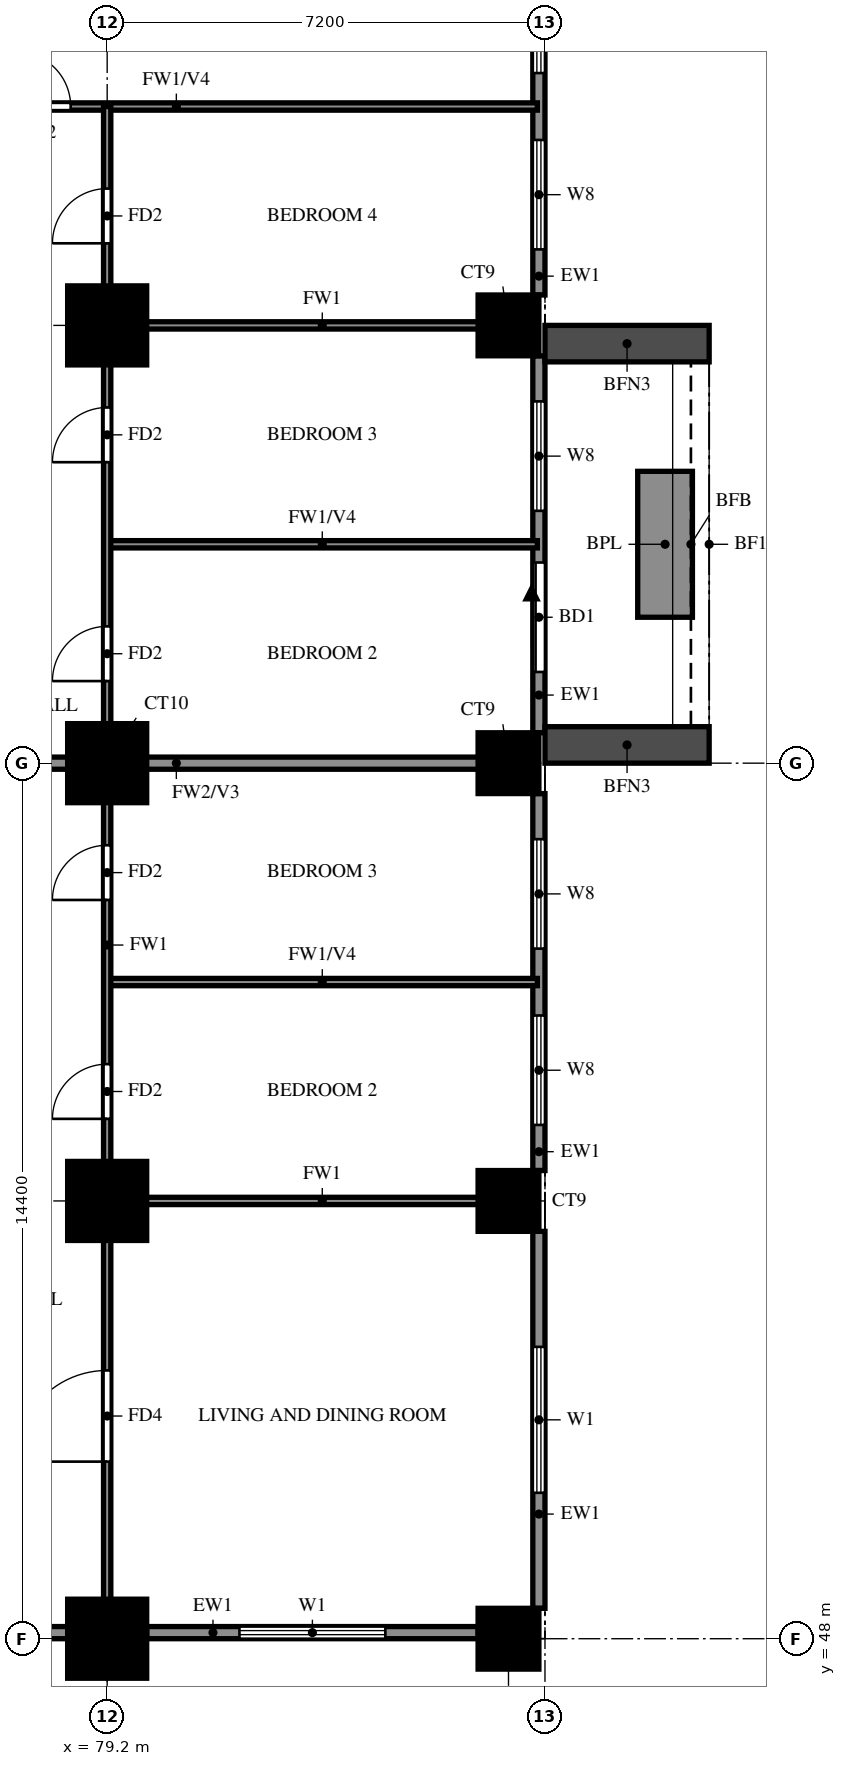
"""IFC4 building model, lengths in metres.
Left out: names, types, materials, properties, quantities, classifications, styles, units other than length and angle.
Written with IfcOpenShell. Run it as: python <this file> out.ifc"""

import sys

from ifc_helpers import new_model, si_unit, direction, frame, frame_2d, origin, origin_2d, place, context, subcontext, project, spatial, rectangle, extrude, source, transform, mapped, element, fill, save


model = new_model("IFC4")
c1 = context("Model", 3, precision=1e-05, world=origin(), true_north=direction((0.0, 1.0)))
c2 = subcontext(c1, "Body", "Model", "MODEL_VIEW")
j1 = project(units=[si_unit("LENGTHUNIT", "METRE"), si_unit("PLANEANGLEUNIT", "RADIAN")], contexts=[c1])
p1 = place(None, origin())
s1 = spatial("IfcSite", under=j1, at=p1, CompositionType="ELEMENT")
p2 = place(p1, origin())
s2 = spatial("IfcBuilding", under=s1, at=p2, CompositionType="ELEMENT")
p3 = place(p2, frame((0.0, 0.0, 76.0)))
s3 = spatial("IfcBuildingStorey", under=s2, at=p3, CompositionType="ELEMENT", Elevation=76.0)
m1 = source(origin(), c2, "Body", "SweptSolid", [
    extrude(rectangle(XDim=1.3, YDim=1.3, at=origin_2d()), origin(), (0.0, 0.0, 1.0), 3.18),
])
p4 = place(p3, frame((79.2, 48.0, 0.0), z_axis=(0.0, 0.0, 1.0), x_axis=(1.0, 0.0, 0.0)))
e1 = element("IfcColumn", 1, at=p4, inside=s3, PredefinedType="COLUMN", context=c2, shape_type="MappedRepresentation", body=[
    mapped(m1, transform((0.0, 0.0, 0.0))),
])
m2 = source(origin(), c2, "Body", "SweptSolid", [
    extrude(rectangle(XDim=1.0, YDim=1.0, at=origin_2d()), origin(), (0.0, 0.0, 1.0), 3.18),
])
p5 = place(p3, frame((85.8, 48.0, 0.0), z_axis=(0.0, 0.0, 1.0), x_axis=(1.0, 0.0, 0.0)))
e2 = element("IfcColumn", 2, at=p5, inside=s3, PredefinedType="COLUMN", context=c2, shape_type="MappedRepresentation", body=[
    mapped(m2, transform((0.0, 0.0, 0.0))),
])
p6 = place(p3, frame((79.2, 55.2, 0.0), z_axis=(0.0, 0.0, 1.0), x_axis=(1.0, 0.0, 0.0)))
e3 = element("IfcColumn", 3, at=p6, inside=s3, PredefinedType="COLUMN", context=c2, shape_type="MappedRepresentation", body=[
    mapped(m1, transform((0.0, 0.0, 0.0))),
])
p7 = place(p3, frame((85.8, 55.2, 0.0), z_axis=(0.0, 0.0, 1.0), x_axis=(1.0, 0.0, 0.0)))
e4 = element("IfcColumn", 4, at=p7, inside=s3, PredefinedType="COLUMN", context=c2, shape_type="MappedRepresentation", body=[
    mapped(m2, transform((0.0, 0.0, 0.0))),
])
p8 = place(p3, frame((79.2, 62.4, 0.0), z_axis=(0.0, 0.0, 1.0), x_axis=(1.0, 0.0, 0.0)))
e5 = element("IfcColumn", 5, at=p8, inside=s3, PredefinedType="COLUMN", context=c2, shape_type="MappedRepresentation", body=[
    mapped(m1, transform((0.0, 0.0, 0.0))),
])
p9 = place(p3, frame((85.8, 62.4, 0.0), z_axis=(0.0, 0.0, 1.0), x_axis=(1.0, 0.0, 0.0)))
e6 = element("IfcColumn", 6, at=p9, inside=s3, PredefinedType="COLUMN", context=c2, shape_type="MappedRepresentation", body=[
    mapped(m2, transform((0.0, 0.0, 0.0))),
])
p10 = place(p3, frame((79.2, 69.6, 0.0), z_axis=(0.0, 0.0, 1.0), x_axis=(1.0, 0.0, 0.0)))
e7 = element("IfcColumn", 7, at=p10, inside=s3, PredefinedType="COLUMN", context=c2, shape_type="MappedRepresentation", body=[
    mapped(m1, transform((0.0, 0.0, 0.0))),
])
p11 = place(p3, frame((85.8, 69.6, 0.0), z_axis=(0.0, 0.0, 1.0), x_axis=(1.0, 0.0, 0.0)))
e8 = element("IfcColumn", 8, at=p11, inside=s3, PredefinedType="COLUMN", context=c2, shape_type="MappedRepresentation", body=[
    mapped(m2, transform((0.0, 0.0, 0.0))),
])
p12 = place(p3, frame((85.996, 33.863, 0.0), z_axis=(0.0, 0.0, 1.0), x_axis=(-0.707100718496, 0.707112843825, 0.0)))
e9 = element("IfcWall", 9, at=p12, inside=s3, PredefinedType="SOLIDWALL", context=c2, shape_type="SweptSolid", body=[
    extrude(rectangle(XDim=20.135, YDim=0.2, at=frame_2d((10.067, 0.0))), origin(), (0.0, 0.0, 1.0), 3.18),
])
p13 = place(p3, frame((71.989, 48.1, 0.0), z_axis=(0.0, 0.0, 1.0), x_axis=(1.0, 0.0, 0.0)))
e10 = element("IfcWall", 10, at=p13, inside=s3, PredefinedType="SOLIDWALL", context=c2, shape_type="SweptSolid", body=[
    extrude(rectangle(XDim=6.562, YDim=0.2, at=frame_2d((3.281, 0.0))), origin(), (0.0, 0.0, 1.0), 3.18),
])
p14 = place(p13, frame((2.206, 0.0, 1.5)))
e11 = element("IfcOpeningElement", 11, at=p14, cuts=e10, PredefinedType="OPENING", context=c2, shape_type="SweptSolid", body=[
    extrude(rectangle(XDim=0.9, YDim=0.9, at=frame_2d((0.45, 0.45))), frame((0.0, 0.11, 0.0), z_axis=(0.0, -1.0, 0.0), x_axis=(1.0, 0.0, 0.0)), (0.0, 0.0, 1.0), 0.22),
])
p15 = place(p3, frame((79.85, 48.1, 0.0), z_axis=(0.0, 0.0, 1.0), x_axis=(1.0, 0.0, 0.0)))
e12 = element("IfcWall", 12, at=p15, inside=s3, PredefinedType="SOLIDWALL", context=c2, shape_type="SweptSolid", body=[
    extrude(rectangle(XDim=5.45, YDim=0.2, at=frame_2d((2.725, 0.0))), origin(), (0.0, 0.0, 1.0), 3.18),
])
p16 = place(p15, frame((1.525, 0.0, 0.6)))
e13 = element("IfcOpeningElement", 13, at=p16, cuts=e12, PredefinedType="OPENING", context=c2, shape_type="SweptSolid", body=[
    extrude(rectangle(XDim=2.4, YDim=2.4, at=frame_2d((1.2, 1.2))), frame((0.0, 0.11, 0.0), z_axis=(0.0, -1.0, 0.0), x_axis=(1.0, 0.0, 0.0)), (0.0, 0.0, 1.0), 0.22),
])
p17 = place(p3, frame((86.3, 48.5, 0.0), z_axis=(0.0, 0.0, 1.0), x_axis=(0.0, 1.0, 0.0)))
e14 = element("IfcWall", 14, at=p17, inside=s3, PredefinedType="SOLIDWALL", context=c2, shape_type="SweptSolid", body=[
    extrude(rectangle(XDim=6.2, YDim=0.2, at=frame_2d((3.1, 0.0))), origin(), (0.0, 0.0, 1.0), 3.18),
])
p18 = place(p17, frame((1.9, 0.0, 0.6)))
e15 = element("IfcOpeningElement", 15, at=p18, cuts=e14, PredefinedType="OPENING", context=c2, shape_type="SweptSolid", body=[
    extrude(rectangle(XDim=2.4, YDim=2.4, at=frame_2d((1.2, 1.2))), frame((0.0, 0.11, 0.0), z_axis=(0.0, -1.0, 0.0), x_axis=(1.0, 0.0, 0.0)), (0.0, 0.0, 1.0), 0.22),
])
p19 = place(p3, frame((86.3, 55.7, 0.0), z_axis=(0.0, 0.0, 1.0), x_axis=(0.0, 1.0, 0.0)))
e16 = element("IfcWall", 16, at=p19, inside=s3, PredefinedType="SOLIDWALL", context=c2, shape_type="SweptSolid", body=[
    extrude(rectangle(XDim=6.2, YDim=0.2, at=frame_2d((3.1, 0.0))), origin(), (0.0, 0.0, 1.0), 3.18),
])
p20 = place(p19, frame((0.75, 0.0, 0.6)))
e17 = element("IfcOpeningElement", 17, at=p20, cuts=e16, PredefinedType="OPENING", context=c2, shape_type="SweptSolid", body=[
    extrude(rectangle(XDim=1.8, YDim=2.4, at=frame_2d((0.9, 1.2))), frame((0.0, 0.11, 0.0), z_axis=(0.0, -1.0, 0.0), x_axis=(1.0, 0.0, 0.0)), (0.0, 0.0, 1.0), 0.22),
])
p21 = place(p19, frame((3.65, 0.0, 0.6)))
e18 = element("IfcOpeningElement", 18, at=p21, cuts=e16, PredefinedType="OPENING", context=c2, shape_type="SweptSolid", body=[
    extrude(rectangle(XDim=1.8, YDim=2.4, at=frame_2d((0.9, 1.2))), frame((0.0, 0.11, 0.0), z_axis=(0.0, -1.0, 0.0), x_axis=(1.0, 0.0, 0.0)), (0.0, 0.0, 1.0), 0.22),
])
p22 = place(p3, frame((86.3, 62.9, 0.0), z_axis=(0.0, 0.0, 1.0), x_axis=(0.0, 1.0, 0.0)))
e19 = element("IfcWall", 19, at=p22, inside=s3, PredefinedType="SOLIDWALL", context=c2, shape_type="SweptSolid", body=[
    extrude(rectangle(XDim=6.2, YDim=0.2, at=frame_2d((3.1, 0.0))), origin(), (0.0, 0.0, 1.0), 3.18),
])
p23 = place(p22, frame((1.0, 0.0, 0.0)))
e20 = element("IfcOpeningElement", 20, at=p23, cuts=e19, PredefinedType="OPENING", context=c2, shape_type="SweptSolid", body=[
    extrude(rectangle(XDim=1.8, YDim=2.4, at=frame_2d((0.9, 1.2))), frame((0.0, 0.11, 0.0), z_axis=(0.0, -1.0, 0.0), x_axis=(1.0, 0.0, 0.0)), (0.0, 0.0, 1.0), 0.22),
])
p24 = place(p22, frame((3.65, 0.0, 0.6)))
e21 = element("IfcOpeningElement", 21, at=p24, cuts=e19, PredefinedType="OPENING", context=c2, shape_type="SweptSolid", body=[
    extrude(rectangle(XDim=1.8, YDim=2.4, at=frame_2d((0.9, 1.2))), frame((0.0, 0.11, 0.0), z_axis=(0.0, -1.0, 0.0), x_axis=(1.0, 0.0, 0.0)), (0.0, 0.0, 1.0), 0.22),
])
p25 = place(p3, frame((86.3, 70.1, 0.0), z_axis=(0.0, 0.0, 1.0), x_axis=(0.0, 1.0, 0.0)))
e22 = element("IfcWall", 22, at=p25, inside=s3, PredefinedType="SOLIDWALL", context=c2, shape_type="SweptSolid", body=[
    extrude(rectangle(XDim=6.2, YDim=0.2, at=frame_2d((3.1, 0.0))), origin(), (0.0, 0.0, 1.0), 3.18),
])
p26 = place(p25, frame((0.75, 0.0, 0.6)))
e23 = element("IfcOpeningElement", 23, at=p26, cuts=e22, PredefinedType="OPENING", context=c2, shape_type="SweptSolid", body=[
    extrude(rectangle(XDim=1.8, YDim=2.4, at=frame_2d((0.9, 1.2))), frame((0.0, 0.11, 0.0), z_axis=(0.0, -1.0, 0.0), x_axis=(1.0, 0.0, 0.0)), (0.0, 0.0, 1.0), 0.22),
])
p27 = place(p25, frame((3.65, 0.0, 0.6)))
e24 = element("IfcOpeningElement", 24, at=p27, cuts=e22, PredefinedType="OPENING", context=c2, shape_type="SweptSolid", body=[
    extrude(rectangle(XDim=1.8, YDim=2.4, at=frame_2d((0.9, 1.2))), frame((0.0, 0.11, 0.0), z_axis=(0.0, -1.0, 0.0), x_axis=(1.0, 0.0, 0.0)), (0.0, 0.0, 1.0), 0.22),
])
for number, where, z_axis, x_axis in (
    (25, (86.4, 62.7, 0.0), (0.0, 0.0, 1.0), (1.0, 0.0, 0.0)),
    (26, (86.4, 69.3, 0.0), (0.0, 0.0, 1.0), (1.0, 0.0, 0.0)),
):
    element("IfcWall", number, at=place(p3, frame(where, z_axis=z_axis, x_axis=x_axis)), inside=s3, PredefinedType="SOLIDWALL", context=c2, shape_type="SweptSolid", body=[
        extrude(rectangle(XDim=2.7, YDim=0.6, at=frame_2d((1.35, 0.0))), origin(), (0.0, 0.0, 1.0), 2.85),
    ])
p28 = place(p3, frame((88.375, 64.8, 0.0), z_axis=(0.0, 0.0, 1.0), x_axis=(0.0, 1.0, 0.0)))
e27 = element("IfcWall", 27, at=p28, inside=s3, PredefinedType="SOLIDWALL", context=c2, shape_type="SweptSolid", body=[
    extrude(rectangle(XDim=2.4, YDim=0.9, at=frame_2d((1.2, 0.0))), origin(), (0.0, 0.0, 1.0), 0.9),
])
p29 = place(p3, frame((74.4, 62.4, 0.0), z_axis=(0.0, 0.0, 1.0), x_axis=(1.0, 0.0, 0.0)))
e28 = element("IfcWall", 28, at=p29, inside=s3, PredefinedType="SOLIDWALL", context=c2, shape_type="SweptSolid", body=[
    extrude(rectangle(XDim=11.875, YDim=0.2, at=frame_2d((5.938, 0.0))), origin(), (0.0, 0.0, 1.0), 3.18),
])
p30 = place(p3, frame((79.2, 55.2, 0.0), z_axis=(0.0, 0.0, 1.0), x_axis=(1.0, 0.0, 0.0)))
e29 = element("IfcWall", 29, at=p30, inside=s3, PredefinedType="PARTITIONING", context=c2, shape_type="SweptSolid", body=[
    extrude(rectangle(XDim=7.075, YDim=0.12, at=frame_2d((3.538, 0.0))), origin(), (0.0, 0.0, 1.0), 3.18),
])
for number, where, z_axis, x_axis in (
    (30, (79.2, 58.8, 0.0), (0.0, 0.0, 1.0), (1.0, 0.0, 0.0)),
    (31, (79.2, 66.0, 0.0), (0.0, 0.0, 1.0), (1.0, 0.0, 0.0)),
):
    element("IfcWall", number, at=place(p3, frame(where, z_axis=z_axis, x_axis=x_axis)), inside=s3, PredefinedType="PARTITIONING", context=c2, shape_type="SweptSolid", body=[
        extrude(rectangle(XDim=7.075, YDim=0.12, at=frame_2d((3.538, 0.0))), origin(), (0.0, 0.0, 1.0), 2.28),
    ])
p31 = place(p3, frame((79.2, 69.6, 0.0), z_axis=(0.0, 0.0, 1.0), x_axis=(1.0, 0.0, 0.0)))
e32 = element("IfcWall", 32, at=p31, inside=s3, PredefinedType="PARTITIONING", context=c2, shape_type="SweptSolid", body=[
    extrude(rectangle(XDim=7.075, YDim=0.12, at=frame_2d((3.538, 0.0))), origin(), (0.0, 0.0, 1.0), 3.18),
])
p32 = place(p3, frame((74.4, 73.2, 0.0), z_axis=(0.0, 0.0, 1.0), x_axis=(1.0, 0.0, 0.0)))
e33 = element("IfcWall", 33, at=p32, inside=s3, PredefinedType="PARTITIONING", context=c2, shape_type="SweptSolid", body=[
    extrude(rectangle(XDim=11.875, YDim=0.12, at=frame_2d((5.938, 0.0))), origin(), (0.0, 0.0, 1.0), 2.28),
])
p33 = place(p32, frame((3.3, 0.0, 0.0)))
e34 = element("IfcOpeningElement", 34, at=p33, cuts=e33, PredefinedType="OPENING", context=c2, shape_type="SweptSolid", body=[
    extrude(rectangle(XDim=0.9, YDim=2.1, at=frame_2d((0.45, 1.05))), frame((0.0, 0.07, 0.0), z_axis=(0.0, -1.0, 0.0), x_axis=(1.0, 0.0, 0.0)), (0.0, 0.0, 1.0), 0.14),
])
p34 = place(p3, frame((79.2, 48.125, 0.0), z_axis=(0.0, 0.0, 1.0), x_axis=(0.0, 1.0, 0.0)))
e35 = element("IfcWall", 35, at=p34, inside=s3, PredefinedType="PARTITIONING", context=c2, shape_type="SweptSolid", body=[
    extrude(rectangle(XDim=25.075, YDim=0.12, at=frame_2d((12.538, 0.0))), origin(), (0.0, 0.0, 1.0), 3.18),
])
p35 = place(p34, frame((2.788, 0.0, 0.0)))
e36 = element("IfcOpeningElement", 36, at=p35, cuts=e35, PredefinedType="OPENING", context=c2, shape_type="SweptSolid", body=[
    extrude(rectangle(XDim=1.5, YDim=2.1, at=frame_2d((0.75, 1.05))), frame((0.0, 0.07, 0.0), z_axis=(0.0, -1.0, 0.0), x_axis=(1.0, 0.0, 0.0)), (0.0, 0.0, 1.0), 0.14),
])
p36 = place(p34, frame((8.425, 0.0, 0.0)))
e37 = element("IfcOpeningElement", 37, at=p36, cuts=e35, PredefinedType="OPENING", context=c2, shape_type="SweptSolid", body=[
    extrude(rectangle(XDim=0.9, YDim=2.1, at=frame_2d((0.45, 1.05))), frame((0.0, 0.07, 0.0), z_axis=(0.0, -1.0, 0.0), x_axis=(1.0, 0.0, 0.0)), (0.0, 0.0, 1.0), 0.14),
])
p37 = place(p34, frame((12.025, 0.0, 0.0)))
e38 = element("IfcOpeningElement", 38, at=p37, cuts=e35, PredefinedType="OPENING", context=c2, shape_type="SweptSolid", body=[
    extrude(rectangle(XDim=0.9, YDim=2.1, at=frame_2d((0.45, 1.05))), frame((0.0, 0.07, 0.0), z_axis=(0.0, -1.0, 0.0), x_axis=(1.0, 0.0, 0.0)), (0.0, 0.0, 1.0), 0.14),
])
p38 = place(p34, frame((15.625, 0.0, 0.0)))
e39 = element("IfcOpeningElement", 39, at=p38, cuts=e35, PredefinedType="OPENING", context=c2, shape_type="SweptSolid", body=[
    extrude(rectangle(XDim=0.9, YDim=2.1, at=frame_2d((0.45, 1.05))), frame((0.0, 0.07, 0.0), z_axis=(0.0, -1.0, 0.0), x_axis=(1.0, 0.0, 0.0)), (0.0, 0.0, 1.0), 0.14),
])
p39 = place(p34, frame((19.225, 0.0, 0.0)))
e40 = element("IfcOpeningElement", 40, at=p39, cuts=e35, PredefinedType="OPENING", context=c2, shape_type="SweptSolid", body=[
    extrude(rectangle(XDim=0.9, YDim=2.1, at=frame_2d((0.45, 1.05))), frame((0.0, 0.07, 0.0), z_axis=(0.0, -1.0, 0.0), x_axis=(1.0, 0.0, 0.0)), (0.0, 0.0, 1.0), 0.14),
])
p40 = place(p34, frame((22.825, 0.0, 0.0)))
e41 = element("IfcOpeningElement", 41, at=p40, cuts=e35, PredefinedType="OPENING", context=c2, shape_type="SweptSolid", body=[
    extrude(rectangle(XDim=0.9, YDim=2.1, at=frame_2d((0.45, 1.05))), frame((0.0, 0.07, 0.0), z_axis=(0.0, -1.0, 0.0), x_axis=(1.0, 0.0, 0.0)), (0.0, 0.0, 1.0), 0.14),
])
p41 = place(p16, origin())
e42 = element("IfcWindow", 42, at=p41, inside=s3, PartitioningType="DOUBLE_PANEL_VERTICAL", PredefinedType="WINDOW", context=c2, shape_type="SweptSolid", body=[
    extrude(rectangle(XDim=2.4, YDim=2.4, at=frame_2d((1.2, 1.2))), frame((0.0, 0.03, 0.0), z_axis=(0.0, -1.0, 0.0), x_axis=(1.0, 0.0, 0.0)), (0.0, 0.0, 1.0), 0.06),
])
fill(e13, e42)
p42 = place(p18, origin())
e43 = element("IfcWindow", 43, at=p42, inside=s3, PartitioningType="DOUBLE_PANEL_VERTICAL", PredefinedType="WINDOW", context=c2, shape_type="SweptSolid", body=[
    extrude(rectangle(XDim=2.4, YDim=2.4, at=frame_2d((1.2, 1.2))), frame((0.0, 0.03, 0.0), z_axis=(0.0, -1.0, 0.0), x_axis=(1.0, 0.0, 0.0)), (0.0, 0.0, 1.0), 0.06),
])
fill(e15, e43)
p43 = place(p20, origin())
e44 = element("IfcWindow", 44, at=p43, inside=s3, PartitioningType="DOUBLE_PANEL_VERTICAL", PredefinedType="WINDOW", context=c2, shape_type="SweptSolid", body=[
    extrude(rectangle(XDim=1.8, YDim=2.4, at=frame_2d((0.9, 1.2))), frame((0.0, 0.03, 0.0), z_axis=(0.0, -1.0, 0.0), x_axis=(1.0, 0.0, 0.0)), (0.0, 0.0, 1.0), 0.06),
])
fill(e17, e44)
p44 = place(p21, origin())
e45 = element("IfcWindow", 45, at=p44, inside=s3, PartitioningType="DOUBLE_PANEL_VERTICAL", PredefinedType="WINDOW", context=c2, shape_type="SweptSolid", body=[
    extrude(rectangle(XDim=1.8, YDim=2.4, at=frame_2d((0.9, 1.2))), frame((0.0, 0.03, 0.0), z_axis=(0.0, -1.0, 0.0), x_axis=(1.0, 0.0, 0.0)), (0.0, 0.0, 1.0), 0.06),
])
fill(e18, e45)
p45 = place(p23, origin())
e46 = element("IfcDoor", 46, at=p45, inside=s3, OperationType="DOUBLE_DOOR_SLIDING", PredefinedType="DOOR", context=c2, shape_type="SweptSolid", body=[
    extrude(rectangle(XDim=1.8, YDim=2.4, at=frame_2d((0.9, 1.2))), frame((0.0, 0.025, 0.0), z_axis=(0.0, -1.0, 0.0), x_axis=(1.0, 0.0, 0.0)), (0.0, 0.0, 1.0), 0.05),
])
fill(e20, e46)
p46 = place(p24, origin())
e47 = element("IfcWindow", 47, at=p46, inside=s3, PartitioningType="DOUBLE_PANEL_VERTICAL", PredefinedType="WINDOW", context=c2, shape_type="SweptSolid", body=[
    extrude(rectangle(XDim=1.8, YDim=2.4, at=frame_2d((0.9, 1.2))), frame((0.0, 0.03, 0.0), z_axis=(0.0, -1.0, 0.0), x_axis=(1.0, 0.0, 0.0)), (0.0, 0.0, 1.0), 0.06),
])
fill(e21, e47)
p47 = place(p26, origin())
e48 = element("IfcWindow", 48, at=p47, inside=s3, PartitioningType="DOUBLE_PANEL_VERTICAL", PredefinedType="WINDOW", context=c2, shape_type="SweptSolid", body=[
    extrude(rectangle(XDim=1.8, YDim=2.4, at=frame_2d((0.9, 1.2))), frame((0.0, 0.03, 0.0), z_axis=(0.0, -1.0, 0.0), x_axis=(1.0, 0.0, 0.0)), (0.0, 0.0, 1.0), 0.06),
])
fill(e23, e48)
p48 = place(p27, origin())
e49 = element("IfcWindow", 49, at=p48, inside=s3, PartitioningType="DOUBLE_PANEL_VERTICAL", PredefinedType="WINDOW", context=c2, shape_type="SweptSolid", body=[
    extrude(rectangle(XDim=1.8, YDim=2.4, at=frame_2d((0.9, 1.2))), frame((0.0, 0.03, 0.0), z_axis=(0.0, -1.0, 0.0), x_axis=(1.0, 0.0, 0.0)), (0.0, 0.0, 1.0), 0.06),
])
fill(e24, e49)
p49 = place(p35, origin())
e50 = element("IfcDoor", 50, at=p49, inside=s3, OperationType="SINGLE_SWING_LEFT", PredefinedType="DOOR", context=c2, shape_type="SweptSolid", body=[
    extrude(rectangle(XDim=1.5, YDim=2.1, at=frame_2d((0.75, 1.05))), frame((0.0, 0.025, 0.0), z_axis=(0.0, -1.0, 0.0), x_axis=(1.0, 0.0, 0.0)), (0.0, 0.0, 1.0), 0.05),
])
fill(e36, e50)
p50 = place(p36, origin())
e51 = element("IfcDoor", 51, at=p50, inside=s3, OperationType="SINGLE_SWING_LEFT", PredefinedType="DOOR", context=c2, shape_type="SweptSolid", body=[
    extrude(rectangle(XDim=0.9, YDim=2.1, at=frame_2d((0.45, 1.05))), frame((0.0, 0.025, 0.0), z_axis=(0.0, -1.0, 0.0), x_axis=(1.0, 0.0, 0.0)), (0.0, 0.0, 1.0), 0.05),
])
fill(e37, e51)
p51 = place(p37, origin())
e52 = element("IfcDoor", 52, at=p51, inside=s3, OperationType="SINGLE_SWING_RIGHT", PredefinedType="DOOR", context=c2, shape_type="SweptSolid", body=[
    extrude(rectangle(XDim=0.9, YDim=2.1, at=frame_2d((0.45, 1.05))), frame((0.0, 0.025, 0.0), z_axis=(0.0, -1.0, 0.0), x_axis=(1.0, 0.0, 0.0)), (0.0, 0.0, 1.0), 0.05),
])
fill(e38, e52)
p52 = place(p38, origin())
e53 = element("IfcDoor", 53, at=p52, inside=s3, OperationType="SINGLE_SWING_LEFT", PredefinedType="DOOR", context=c2, shape_type="SweptSolid", body=[
    extrude(rectangle(XDim=0.9, YDim=2.1, at=frame_2d((0.45, 1.05))), frame((0.0, 0.025, 0.0), z_axis=(0.0, -1.0, 0.0), x_axis=(1.0, 0.0, 0.0)), (0.0, 0.0, 1.0), 0.05),
])
fill(e39, e53)
p53 = place(p39, origin())
e54 = element("IfcDoor", 54, at=p53, inside=s3, OperationType="SINGLE_SWING_LEFT", PredefinedType="DOOR", context=c2, shape_type="SweptSolid", body=[
    extrude(rectangle(XDim=0.9, YDim=2.1, at=frame_2d((0.45, 1.05))), frame((0.0, 0.025, 0.0), z_axis=(0.0, -1.0, 0.0), x_axis=(1.0, 0.0, 0.0)), (0.0, 0.0, 1.0), 0.05),
])
fill(e40, e54)
p54 = place(p40, origin())
e55 = element("IfcDoor", 55, at=p54, inside=s3, OperationType="SINGLE_SWING_RIGHT", PredefinedType="DOOR", context=c2, shape_type="SweptSolid", body=[
    extrude(rectangle(XDim=0.9, YDim=2.1, at=frame_2d((0.45, 1.05))), frame((0.0, 0.025, 0.0), z_axis=(0.0, -1.0, 0.0), x_axis=(1.0, 0.0, 0.0)), (0.0, 0.0, 1.0), 0.05),
])
fill(e41, e55)
p55 = place(p33, origin())
e56 = element("IfcDoor", 56, at=p55, inside=s3, OperationType="SINGLE_SWING_LEFT", PredefinedType="DOOR", context=c2, shape_type="SweptSolid", body=[
    extrude(rectangle(XDim=0.9, YDim=2.1, at=frame_2d((0.45, 1.05))), frame((0.0, 0.025, 0.0), z_axis=(0.0, -1.0, 0.0), x_axis=(1.0, 0.0, 0.0)), (0.0, 0.0, 1.0), 0.05),
])
fill(e34, e56)
save(model, sys.argv[1])
